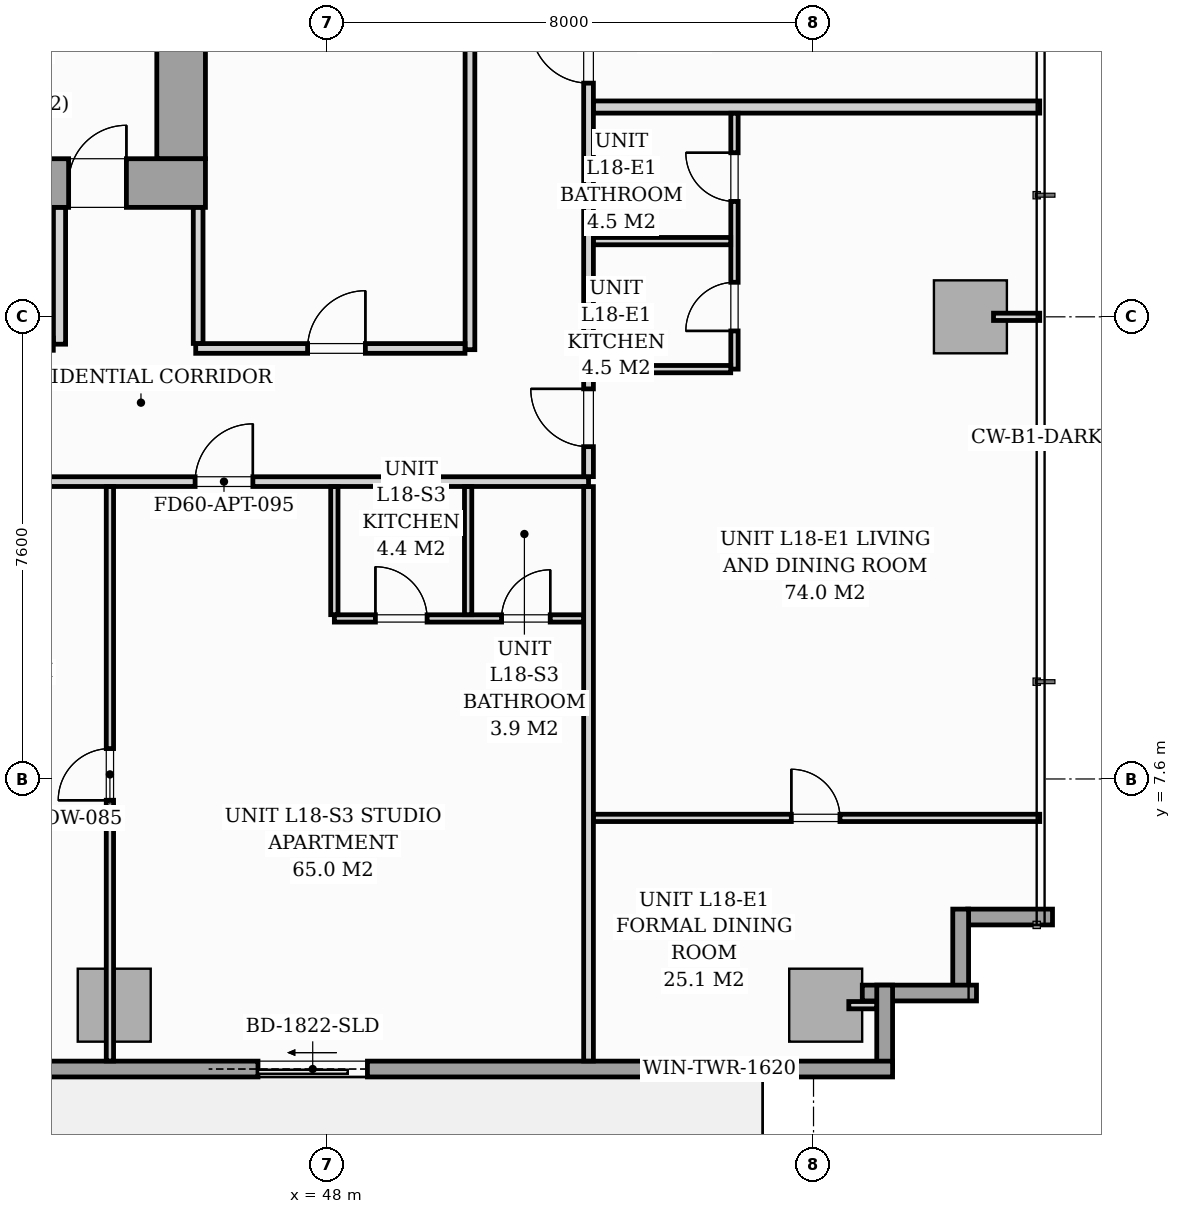
"""IFC4 building model, lengths in metres.
Left out: names, types, materials, properties, quantities, classifications, styles, units other than length and angle.
Written with IfcOpenShell. Run it as: python <this file> out.ifc"""

import sys

from ifc_helpers import new_model, si_unit, direction, frame, frame_2d, origin, origin_2d, place, context, subcontext, project, spatial, rectangle, i_section, extrude, source, transform, mapped, element, fill, save


model = new_model("IFC4")
c1 = context("Model", 3, precision=1e-05, world=origin(), true_north=direction((0.0, 1.0)))
c2 = subcontext(c1, "Body", "Model", "MODEL_VIEW")
j1 = project(units=[si_unit("LENGTHUNIT", "METRE"), si_unit("PLANEANGLEUNIT", "RADIAN")], contexts=[c1])
p1 = place(None, origin())
s1 = spatial("IfcSite", under=j1, at=p1, CompositionType="ELEMENT")
p2 = place(p1, origin())
s2 = spatial("IfcBuilding", under=s1, at=p2, CompositionType="ELEMENT")
p3 = place(p2, frame((0.0, 0.0, 64.6)))
s3 = spatial("IfcBuildingStorey", under=s2, at=p3, CompositionType="ELEMENT", Elevation=64.6)
m1 = source(origin(), c2, "Body", "SweptSolid", [
    extrude(i_section(OverallWidth=0.437, OverallDepth=0.514, WebThickness=0.061, FlangeThickness=0.097, FilletRadius=0.018, at=origin_2d()), origin(), (0.0, 0.0, 1.0), 3.196),
])
p4 = place(p3, frame((45.6, 17.4, 0.002), z_axis=(0.0, 0.0, 1.0), x_axis=(1.0, 0.0, 0.0)))
e1 = element("IfcColumn", 1, at=p4, inside=s3, PredefinedType="PILASTER", context=c2, shape_type="MappedRepresentation", body=[
    mapped(m1, transform((0.0, 0.0, 0.0), scale=1.0)),
])
m2 = source(origin(), c2, "Body", "SweptSolid", [
    extrude(rectangle(XDim=1.2, YDim=1.2, at=origin_2d()), origin(), (0.0, 0.0, 1.0), 3.194),
])
for number, where, z_axis, x_axis in (
    (2, (44.5, 3.88, 0.002), (0.0, 0.0, 1.0), (1.0, 0.0, 0.0)),
    (3, (56.2, 3.88, 0.002), (0.0, 0.0, 1.0), (1.0, 0.0, 0.0)),
    (4, (58.58, 15.2, 0.002), (0.0, 0.0, 1.0), (1.0, 0.0, 0.0)),
):
    element("IfcColumn", number, at=place(p3, frame(where, z_axis=z_axis, x_axis=x_axis)), inside=s3, PredefinedType="COLUMN", context=c2, shape_type="MappedRepresentation", body=[
        mapped(m2, transform((0.0, 0.0, 0.0), scale=1.0)),
    ])
for number, where, z_axis, x_axis in (
    (5, (59.93, 5.33, 0.0), (0.0, 0.0, 1.0), (-1.0, 0.0, 0.0)),
    (6, (58.42, 5.46, 0.0), (0.0, 0.0, 1.0), (0.0, -1.0, 0.0)),
):
    element("IfcWall", number, at=place(p3, frame(where, z_axis=z_axis, x_axis=x_axis)), inside=s3, PredefinedType="STANDARD", context=c2, shape_type="SweptSolid", body=[
        extrude(rectangle(XDim=1.395, YDim=0.26, at=frame_2d((0.698, 0.0))), origin(), (0.0, 0.0, 1.0), 2.9),
    ])
p5 = place(p3, frame((58.68, 4.08, 0.0), z_axis=(0.0, 0.0, 1.0), x_axis=(-1.0, 0.0, 0.0)))
e7 = element("IfcWall", 7, at=p5, inside=s3, PredefinedType="STANDARD", context=c2, shape_type="SweptSolid", body=[
    extrude(rectangle(XDim=1.878, YDim=0.26, at=frame_2d((0.939, 0.0))), origin(), (0.0, 0.0, 1.0), 2.9),
])
p6 = place(p3, frame((57.17, 4.21, 0.0), z_axis=(0.0, 0.0, 1.0), x_axis=(0.0, -1.0, 0.0)))
e8 = element("IfcWall", 8, at=p6, inside=s3, PredefinedType="STANDARD", context=c2, shape_type="SweptSolid", body=[
    extrude(rectangle(XDim=1.395, YDim=0.26, at=frame_2d((0.698, 0.0))), origin(), (0.0, 0.0, 1.0), 2.9),
])
p7 = place(p3, frame((57.3, 2.83, 0.0), z_axis=(0.0, 0.0, 1.0), x_axis=(-1.0, 0.0, 0.0)))
e9 = element("IfcWall", 9, at=p7, inside=s3, PredefinedType="STANDARD", context=c2, shape_type="SweptSolid", body=[
    extrude(rectangle(XDim=17.15, YDim=0.26, at=frame_2d((8.575, 0.0))), origin(), (0.0, 0.0, 1.0), 2.9),
])
p8 = place(p7, frame((8.636, 0.0, 0.0)))
e10 = element("IfcOpeningElement", 10, at=p8, cuts=e9, PredefinedType="OPENING", context=c2, shape_type="SweptSolid", body=[
    extrude(rectangle(XDim=1.8, YDim=2.06, at=frame_2d((0.9, 1.03))), frame((0.0, 0.14, 0.0), z_axis=(0.0, -1.0, 0.0), x_axis=(1.0, 0.0, 0.0)), (0.0, 0.0, 1.0), 0.28),
])
p9 = place(p7, frame((2.05, 0.0, 0.65)))
e11 = element("IfcOpeningElement", 11, at=p9, cuts=e9, PredefinedType="OPENING", context=c2, shape_type="SweptSolid", body=[
    extrude(rectangle(XDim=1.6, YDim=1.5, at=frame_2d((0.8, 0.75))), frame((0.0, 0.14, 0.0), z_axis=(0.0, -1.0, 0.0), x_axis=(1.0, 0.0, 0.0)), (0.0, 0.0, 1.0), 0.28),
])
p10 = place(p3, frame((26.0, 17.4, 0.0), z_axis=(0.0, 0.0, 1.0), x_axis=(1.0, 0.0, 0.0)))
e12 = element("IfcWall", 12, at=p10, inside=s3, PredefinedType="SHEAR", context=c2, shape_type="SweptSolid", body=[
    extrude(rectangle(XDim=20.0, YDim=0.8, at=frame_2d((10.0, 0.0))), origin(), (0.0, 0.0, 1.0), 3.2),
])
p11 = place(p10, frame((1.15, 0.0, 0.0)))
e13 = element("IfcOpeningElement", 13, at=p11, cuts=e12, PredefinedType="OPENING", context=c2, shape_type="SweptSolid", body=[
    extrude(rectangle(XDim=0.95, YDim=2.06, at=frame_2d((0.475, 1.03))), frame((0.0, 0.41, 0.0), z_axis=(0.0, -1.0, 0.0), x_axis=(1.0, 0.0, 0.0)), (0.0, 0.0, 1.0), 0.82),
])
p12 = place(p10, frame((9.58, 0.0, 0.0)))
e14 = element("IfcOpeningElement", 14, at=p12, cuts=e12, PredefinedType="OPENING", context=c2, shape_type="SweptSolid", body=[
    extrude(rectangle(XDim=0.85, YDim=2.0, at=frame_2d((0.425, 1.0))), frame((0.0, 0.41, 0.0), z_axis=(0.0, -1.0, 0.0), x_axis=(1.0, 0.0, 0.0)), (0.0, 0.0, 1.0), 0.82),
])
p13 = place(p10, frame((17.75, 0.0, 0.0)))
e15 = element("IfcOpeningElement", 15, at=p13, cuts=e12, PredefinedType="OPENING", context=c2, shape_type="SweptSolid", body=[
    extrude(rectangle(XDim=0.95, YDim=2.06, at=frame_2d((0.475, 1.03))), frame((0.0, 0.41, 0.0), z_axis=(0.0, -1.0, 0.0), x_axis=(1.0, 0.0, 0.0)), (0.0, 0.0, 1.0), 0.82),
])
p14 = place(p3, frame((45.6, 17.802, 0.0), z_axis=(0.0, 0.0, 1.0), x_axis=(0.0, 1.0, 0.0)))
e16 = element("IfcWall", 16, at=p14, inside=s3, PredefinedType="SHEAR", context=c2, shape_type="SweptSolid", body=[
    extrude(rectangle(XDim=5.796, YDim=0.8, at=frame_2d((2.898, 0.0))), origin(), (0.0, 0.0, 1.0), 3.2),
])
p15 = place(p3, frame((43.6, 14.75, 0.0), z_axis=(0.0, 0.0, 1.0), x_axis=(0.0, 1.0, 0.0)))
e17 = element("IfcWall", 17, at=p15, inside=s3, PredefinedType="PARTITIONING", context=c2, shape_type="SweptSolid", body=[
    extrude(rectangle(XDim=2.248, YDim=0.2, at=frame_2d((1.124, 0.0))), origin(), (0.0, 0.0, 1.0), 2.9),
])
p16 = place(p3, frame((41.352, 14.75, 0.0), z_axis=(0.0, 0.0, 1.0), x_axis=(1.0, 0.0, 0.0)))
e18 = element("IfcWall", 18, at=p16, inside=s3, PredefinedType="PARTITIONING", context=c2, shape_type="SweptSolid", body=[
    extrude(rectangle(XDim=2.146, YDim=0.2, at=frame_2d((1.073, 0.0))), origin(), (0.0, 0.0, 1.0), 2.9),
])
p17 = place(p3, frame((15.2, 12.49, 0.0), z_axis=(0.0, 0.0, 1.0), x_axis=(1.0, 0.0, 0.0)))
e19 = element("IfcWall", 19, at=p17, inside=s3, PredefinedType="PARTITIONING", context=c2, shape_type="SweptSolid", body=[
    extrude(rectangle(XDim=37.1, YDim=0.16, at=frame_2d((18.55, 0.0))), origin(), (0.0, 0.0, 1.0), 2.9),
])
p18 = place(p17, frame((5.863, 0.0, 0.0)))
e20 = element("IfcOpeningElement", 20, at=p18, cuts=e19, PredefinedType="OPENING", context=c2, shape_type="SweptSolid", body=[
    extrude(rectangle(XDim=0.95, YDim=2.06, at=frame_2d((0.475, 1.03))), frame((0.0, 0.09, 0.0), z_axis=(0.0, -1.0, 0.0), x_axis=(1.0, 0.0, 0.0)), (0.0, 0.0, 1.0), 0.18),
])
p19 = place(p17, frame((18.25, 0.0, 0.0)))
e21 = element("IfcOpeningElement", 21, at=p19, cuts=e19, PredefinedType="OPENING", context=c2, shape_type="SweptSolid", body=[
    extrude(rectangle(XDim=0.95, YDim=2.06, at=frame_2d((0.475, 1.03))), frame((0.0, 0.09, 0.0), z_axis=(0.0, -1.0, 0.0), x_axis=(1.0, 0.0, 0.0)), (0.0, 0.0, 1.0), 0.18),
])
p20 = place(p17, frame((30.63, 0.0, 0.0)))
e22 = element("IfcOpeningElement", 22, at=p20, cuts=e19, PredefinedType="OPENING", context=c2, shape_type="SweptSolid", body=[
    extrude(rectangle(XDim=0.95, YDim=2.06, at=frame_2d((0.475, 1.03))), frame((0.0, 0.09, 0.0), z_axis=(0.0, -1.0, 0.0), x_axis=(1.0, 0.0, 0.0)), (0.0, 0.0, 1.0), 0.18),
])
p21 = place(p3, frame((52.3, 2.962, 0.0), z_axis=(0.0, 0.0, 1.0), x_axis=(0.0, 1.0, 0.0)))
e23 = element("IfcWall", 23, at=p21, inside=s3, PredefinedType="PARTITIONING", context=c2, shape_type="SweptSolid", body=[
    extrude(rectangle(XDim=9.446, YDim=0.16, at=frame_2d((4.723, 0.0))), origin(), (0.0, 0.0, 1.0), 2.9),
])
p22 = place(p3, frame((52.3, 12.572, 0.0), z_axis=(0.0, 0.0, 1.0), x_axis=(0.0, 1.0, 0.0)))
e24 = element("IfcWall", 24, at=p22, inside=s3, PredefinedType="PARTITIONING", context=c2, shape_type="SweptSolid", body=[
    extrude(rectangle(XDim=14.866, YDim=0.16, at=frame_2d((7.433, 0.0))), origin(), (0.0, 0.0, 1.0), 2.9),
])
p23 = place(p22, frame((0.493, 0.0, 0.0)))
e25 = element("IfcOpeningElement", 25, at=p23, cuts=e24, PredefinedType="OPENING", context=c2, shape_type="SweptSolid", body=[
    extrude(rectangle(XDim=0.95, YDim=2.06, at=frame_2d((0.475, 1.03))), frame((0.0, 0.09, 0.0), z_axis=(0.0, -1.0, 0.0), x_axis=(1.0, 0.0, 0.0)), (0.0, 0.0, 1.0), 0.18),
])
p24 = place(p22, frame((6.471, 0.0, 0.0)))
e26 = element("IfcOpeningElement", 26, at=p24, cuts=e24, PredefinedType="OPENING", context=c2, shape_type="SweptSolid", body=[
    extrude(rectangle(XDim=0.95, YDim=2.06, at=frame_2d((0.475, 1.03))), frame((0.0, 0.09, 0.0), z_axis=(0.0, -1.0, 0.0), x_axis=(1.0, 0.0, 0.0)), (0.0, 0.0, 1.0), 0.18),
])
p25 = place(p3, frame((48.12, 10.24, 0.0), z_axis=(0.0, 0.0, 1.0), x_axis=(1.0, 0.0, 0.0)))
e27 = element("IfcWall", 27, at=p25, inside=s3, PredefinedType="PARTITIONING", context=c2, shape_type="SweptSolid", body=[
    extrude(rectangle(XDim=4.098, YDim=0.12, at=frame_2d((2.049, 0.0))), origin(), (0.0, 0.0, 1.0), 2.9),
])
p26 = place(p25, frame((0.675, 0.0, 0.0)))
e28 = element("IfcOpeningElement", 28, at=p26, cuts=e27, PredefinedType="OPENING", context=c2, shape_type="SweptSolid", body=[
    extrude(rectangle(XDim=0.85, YDim=2.05, at=frame_2d((0.425, 1.025))), frame((0.0, 0.07, 0.0), z_axis=(0.0, -1.0, 0.0), x_axis=(1.0, 0.0, 0.0)), (0.0, 0.0, 1.0), 0.14),
])
p27 = place(p25, frame((2.75, 0.0, 0.0)))
e29 = element("IfcOpeningElement", 29, at=p27, cuts=e27, PredefinedType="OPENING", context=c2, shape_type="SweptSolid", body=[
    extrude(rectangle(XDim=0.8, YDim=2.02, at=frame_2d((0.4, 1.01))), frame((0.0, 0.07, 0.0), z_axis=(0.0, -1.0, 0.0), x_axis=(1.0, 0.0, 0.0)), (0.0, 0.0, 1.0), 0.14),
])
for number, where, z_axis, x_axis in (
    (30, (48.12, 10.302, 0.0), (0.0, 0.0, 1.0), (0.0, 1.0, 0.0)),
    (31, (50.32, 10.302, 0.0), (0.0, 0.0, 1.0), (0.0, 1.0, 0.0)),
):
    element("IfcWall", number, at=place(p3, frame(where, z_axis=z_axis, x_axis=x_axis)), inside=s3, PredefinedType="PARTITIONING", context=c2, shape_type="SweptSolid", body=[
        extrude(rectangle(XDim=2.106, YDim=0.12, at=frame_2d((1.053, 0.0))), origin(), (0.0, 0.0, 1.0), 2.9),
    ])
p28 = place(p3, frame((44.429, 2.962, 0.0), z_axis=(0.0, 0.0, 1.0), x_axis=(0.0, 1.0, 0.0)))
e32 = element("IfcWall", 32, at=p28, inside=s3, PredefinedType="PARTITIONING", context=c2, shape_type="SweptSolid", body=[
    extrude(rectangle(XDim=9.446, YDim=0.12, at=frame_2d((4.723, 0.0))), origin(), (0.0, 0.0, 1.0), 2.096),
])
p29 = place(p28, frame((4.288, 0.0, 0.0)))
e33 = element("IfcOpeningElement", 33, at=p29, cuts=e32, PredefinedType="OPENING", context=c2, shape_type="SweptSolid", body=[
    extrude(rectangle(XDim=0.85, YDim=2.01, at=frame_2d((0.425, 1.005))), frame((0.0, 0.07, 0.0), z_axis=(0.0, -1.0, 0.0), x_axis=(1.0, 0.0, 0.0)), (0.0, 0.0, 1.0), 0.14),
])
p30 = place(p3, frame((52.382, 18.65, 0.0), z_axis=(0.0, 0.0, 1.0), x_axis=(1.0, 0.0, 0.0)))
e34 = element("IfcWall", 34, at=p30, inside=s3, PredefinedType="PARTITIONING", context=c2, shape_type="SweptSolid", body=[
    extrude(rectangle(XDim=7.338, YDim=0.2, at=frame_2d((3.669, 0.0))), origin(), (0.0, 0.0, 1.0), 2.9),
])
p31 = place(p3, frame((54.7, 14.34, 0.0), z_axis=(0.0, 0.0, 1.0), x_axis=(0.0, 1.0, 0.0)))
e35 = element("IfcWall", 35, at=p31, inside=s3, PredefinedType="PARTITIONING", context=c2, shape_type="SweptSolid", body=[
    extrude(rectangle(XDim=4.208, YDim=0.12, at=frame_2d((2.104, 0.0))), origin(), (0.0, 0.0, 1.0), 2.005),
])
p32 = place(p31, frame((0.628, 0.0, 0.0)))
e36 = element("IfcOpeningElement", 36, at=p32, cuts=e35, PredefinedType="OPENING", context=c2, shape_type="SweptSolid", body=[
    extrude(rectangle(XDim=0.8, YDim=2.0, at=frame_2d((0.4, 1.0))), frame((0.0, 0.07, 0.0), z_axis=(0.0, -1.0, 0.0), x_axis=(1.0, 0.0, 0.0)), (0.0, 0.0, 1.0), 0.14),
])
p33 = place(p31, frame((2.758, 0.0, 0.0)))
e37 = element("IfcOpeningElement", 37, at=p33, cuts=e35, PredefinedType="OPENING", context=c2, shape_type="SweptSolid", body=[
    extrude(rectangle(XDim=0.8, YDim=2.0, at=frame_2d((0.4, 1.0))), frame((0.0, 0.07, 0.0), z_axis=(0.0, -1.0, 0.0), x_axis=(1.0, 0.0, 0.0)), (0.0, 0.0, 1.0), 0.14),
])
p34 = place(p3, frame((52.382, 16.445, 0.0), z_axis=(0.0, 0.0, 1.0), x_axis=(1.0, 0.0, 0.0)))
e38 = element("IfcWall", 38, at=p34, inside=s3, PredefinedType="PARTITIONING", context=c2, shape_type="SweptSolid", body=[
    extrude(rectangle(XDim=2.256, YDim=0.12, at=frame_2d((1.128, 0.0))), origin(), (0.0, 0.0, 1.0), 2.005),
])
p35 = place(p3, frame((52.382, 14.34, 0.0), z_axis=(0.0, 0.0, 1.0), x_axis=(1.0, 0.0, 0.0)))
e39 = element("IfcWall", 39, at=p35, inside=s3, PredefinedType="PARTITIONING", context=c2, shape_type="SweptSolid", body=[
    extrude(rectangle(XDim=2.256, YDim=0.12, at=frame_2d((1.128, 0.0))), origin(), (0.0, 0.0, 1.0), 2.9),
])
p36 = place(p3, frame((52.382, 6.96, 0.0), z_axis=(0.0, 0.0, 1.0), x_axis=(1.0, 0.0, 0.0)))
e40 = element("IfcWall", 40, at=p36, inside=s3, PredefinedType="PARTITIONING", context=c2, shape_type="SweptSolid", body=[
    extrude(rectangle(XDim=7.338, YDim=0.12, at=frame_2d((3.669, 0.0))), origin(), (0.0, 0.0, 1.0), 2.9),
])
p37 = place(p36, frame((3.253, 0.0, 0.0)))
e41 = element("IfcOpeningElement", 41, at=p37, cuts=e40, PredefinedType="OPENING", context=c2, shape_type="SweptSolid", body=[
    extrude(rectangle(XDim=0.8, YDim=2.0, at=frame_2d((0.4, 1.0))), frame((0.0, 0.07, 0.0), z_axis=(0.0, -1.0, 0.0), x_axis=(1.0, 0.0, 0.0)), (0.0, 0.0, 1.0), 0.14),
])
p38 = place(p3, frame((50.35, 14.66, 0.0), z_axis=(0.0, 0.0, 1.0), x_axis=(0.0, 1.0, 0.0)))
e42 = element("IfcWall", 42, at=p38, inside=s3, PredefinedType="PARTITIONING", context=c2, shape_type="SweptSolid", body=[
    extrude(rectangle(XDim=5.99, YDim=0.16, at=frame_2d((2.995, 0.0))), origin(), (0.0, 0.0, 1.0), 2.9),
])
p39 = place(p3, frame((45.84, 14.68, 0.0), z_axis=(0.0, 0.0, 1.0), x_axis=(1.0, 0.0, 0.0)))
e43 = element("IfcWall", 43, at=p39, inside=s3, PredefinedType="PARTITIONING", context=c2, shape_type="SweptSolid", body=[
    extrude(rectangle(XDim=4.428, YDim=0.16, at=frame_2d((2.214, 0.0))), origin(), (0.0, 0.0, 1.0), 2.9),
])
p40 = place(p39, frame((1.84, 0.0, 0.0)))
e44 = element("IfcOpeningElement", 44, at=p40, cuts=e43, PredefinedType="OPENING", context=c2, shape_type="SweptSolid", body=[
    extrude(rectangle(XDim=0.95, YDim=2.06, at=frame_2d((0.475, 1.03))), frame((0.0, 0.09, 0.0), z_axis=(0.0, -1.0, 0.0), x_axis=(1.0, 0.0, 0.0)), (0.0, 0.0, 1.0), 0.18),
])
p41 = place(p3, frame((45.88, 14.762, 0.0), z_axis=(0.0, 0.0, 1.0), x_axis=(0.0, 1.0, 0.0)))
e45 = element("IfcWall", 45, at=p41, inside=s3, PredefinedType="PARTITIONING", context=c2, shape_type="SweptSolid", body=[
    extrude(rectangle(XDim=2.236, YDim=0.16, at=frame_2d((1.118, 0.0))), origin(), (0.0, 0.0, 1.0), 2.9),
])
p42 = place(p3, frame((56.58, 3.88, 0.0), z_axis=(0.0, 0.0, 1.0), x_axis=(1.0, 0.0, 0.0)))
e46 = element("IfcWall", 46, at=p42, inside=s3, PredefinedType="PARTITIONING", context=c2, shape_type="SweptSolid", body=[
    extrude(rectangle(XDim=0.458, YDim=0.12, at=frame_2d((0.229, 0.0))), origin(), (0.0, 0.0, 1.0), 2.9),
])
p43 = place(p3, frame((58.96, 15.2, 0.0), z_axis=(0.0, 0.0, 1.0), x_axis=(1.0, 0.0, 0.0)))
e47 = element("IfcWall", 47, at=p43, inside=s3, PredefinedType="PARTITIONING", context=c2, shape_type="SweptSolid", body=[
    extrude(rectangle(XDim=0.76, YDim=0.12, at=frame_2d((0.38, 0.0))), origin(), (0.0, 0.0, 1.0), 2.9),
])
m3 = source(origin(), c2, "Body", "SweptSolid", [
    extrude(rectangle(XDim=1.8, YDim=2.06, at=frame_2d((0.9, 1.03))), frame((0.0, 0.025, 0.0), z_axis=(0.0, -1.0, 0.0), x_axis=(1.0, 0.0, 0.0)), (0.0, 0.0, 1.0), 0.05),
])
p44 = place(p8, origin())
e48 = element("IfcDoor", 48, at=p44, inside=s3, OperationType="SLIDING_TO_RIGHT", PredefinedType="DOOR", context=c2, shape_type="MappedRepresentation", body=[
    mapped(m3, transform((0.0, 0.0, 0.0), scale=1.0)),
])
fill(e10, e48)
m4 = source(origin(), c2, "Body", "SweptSolid", [
    extrude(rectangle(XDim=1.6, YDim=1.5, at=frame_2d((0.8, 0.75))), frame((0.0, 0.03, 0.0), z_axis=(0.0, -1.0, 0.0), x_axis=(1.0, 0.0, 0.0)), (0.0, 0.0, 1.0), 0.06),
])
p45 = place(p9, origin())
e49 = element("IfcWindow", 49, at=p45, inside=s3, PartitioningType="SINGLE_PANEL", PredefinedType="WINDOW", context=c2, shape_type="MappedRepresentation", body=[
    mapped(m4, transform((0.0, 0.0, 0.0), scale=1.0)),
])
fill(e11, e49)
m5 = source(origin(), c2, "Body", "SweptSolid", [
    extrude(rectangle(XDim=0.95, YDim=2.06, at=frame_2d((0.475, 1.03))), frame((0.0, 0.025, 0.0), z_axis=(0.0, -1.0, 0.0), x_axis=(1.0, 0.0, 0.0)), (0.0, 0.0, 1.0), 0.05),
])
p46 = place(p13, origin())
e50 = element("IfcDoor", 50, at=p46, inside=s3, OperationType="SINGLE_SWING_RIGHT", PredefinedType="DOOR", context=c2, shape_type="MappedRepresentation", body=[
    mapped(m5, transform((0.0, 0.0, 0.0), scale=1.0)),
])
fill(e15, e50)
m6 = source(origin(), c2, "Body", "SweptSolid", [
    extrude(rectangle(XDim=0.85, YDim=2.01, at=frame_2d((0.425, 1.005))), frame((0.0, 0.025, 0.0), z_axis=(0.0, -1.0, 0.0), x_axis=(1.0, 0.0, 0.0)), (0.0, 0.0, 1.0), 0.05),
])
p47 = place(p29, origin())
e51 = element("IfcDoor", 51, at=p47, inside=s3, OperationType="SINGLE_SWING_LEFT", PredefinedType="DOOR", context=c2, shape_type="MappedRepresentation", body=[
    mapped(m6, transform((0.0, 0.0, 0.0), scale=1.0)),
])
fill(e33, e51)
m7 = source(origin(), c2, "Body", "SweptSolid", [
    extrude(rectangle(XDim=0.95, YDim=2.06, at=frame_2d((0.475, 1.03))), frame((0.0, 0.025, 0.0), z_axis=(0.0, -1.0, 0.0), x_axis=(1.0, 0.0, 0.0)), (0.0, 0.0, 1.0), 0.05),
])
p48 = place(p20, origin())
e52 = element("IfcDoor", 52, at=p48, inside=s3, OperationType="SINGLE_SWING_RIGHT", PredefinedType="DOOR", context=c2, shape_type="MappedRepresentation", body=[
    mapped(m7, transform((0.0, 0.0, 0.0), scale=1.0)),
])
fill(e22, e52)
m8 = source(origin(), c2, "Body", "SweptSolid", [
    extrude(rectangle(XDim=0.85, YDim=2.05, at=frame_2d((0.425, 1.025))), frame((0.0, 0.025, 0.0), z_axis=(0.0, -1.0, 0.0), x_axis=(1.0, 0.0, 0.0)), (0.0, 0.0, 1.0), 0.05),
])
p49 = place(p26, origin())
e53 = element("IfcDoor", 53, at=p49, inside=s3, OperationType="SINGLE_SWING_LEFT", PredefinedType="DOOR", context=c2, shape_type="MappedRepresentation", body=[
    mapped(m8, transform((0.0, 0.0, 0.0), scale=1.0)),
])
fill(e28, e53)
m9 = source(origin(), c2, "Body", "SweptSolid", [
    extrude(rectangle(XDim=0.8, YDim=2.02, at=frame_2d((0.4, 1.01))), frame((0.0, 0.025, 0.0), z_axis=(0.0, -1.0, 0.0), x_axis=(1.0, 0.0, 0.0)), (0.0, 0.0, 1.0), 0.05),
])
p50 = place(p27, origin())
e54 = element("IfcDoor", 54, at=p50, inside=s3, OperationType="SINGLE_SWING_RIGHT", PredefinedType="DOOR", context=c2, shape_type="MappedRepresentation", body=[
    mapped(m9, transform((0.0, 0.0, 0.0), scale=1.0)),
])
fill(e29, e54)
p51 = place(p23, origin())
e55 = element("IfcDoor", 55, at=p51, inside=s3, OperationType="SINGLE_SWING_RIGHT", PredefinedType="DOOR", context=c2, shape_type="MappedRepresentation", body=[
    mapped(m7, transform((0.0, 0.0, 0.0), scale=1.0)),
])
fill(e25, e55)
m10 = source(origin(), c2, "Body", "SweptSolid", [
    extrude(rectangle(XDim=0.8, YDim=2.0, at=frame_2d((0.4, 1.0))), frame((0.0, 0.025, 0.0), z_axis=(0.0, -1.0, 0.0), x_axis=(1.0, 0.0, 0.0)), (0.0, 0.0, 1.0), 0.05),
])
p52 = place(p32, origin())
e56 = element("IfcDoor", 56, at=p52, inside=s3, OperationType="SINGLE_SWING_LEFT", PredefinedType="DOOR", context=c2, shape_type="MappedRepresentation", body=[
    mapped(m10, transform((0.0, 0.0, 0.0), scale=1.0)),
])
fill(e36, e56)
p53 = place(p33, origin())
e57 = element("IfcDoor", 57, at=p53, inside=s3, OperationType="SINGLE_SWING_RIGHT", PredefinedType="DOOR", context=c2, shape_type="MappedRepresentation", body=[
    mapped(m10, transform((0.0, 0.0, 0.0), scale=1.0)),
])
fill(e37, e57)
p54 = place(p37, origin())
e58 = element("IfcDoor", 58, at=p54, inside=s3, OperationType="SINGLE_SWING_LEFT", PredefinedType="DOOR", context=c2, shape_type="MappedRepresentation", body=[
    mapped(m10, transform((0.0, 0.0, 0.0), scale=1.0)),
])
fill(e41, e58)
p55 = place(p24, origin())
e59 = element("IfcDoor", 59, at=p55, inside=s3, OperationType="SINGLE_SWING_RIGHT", PredefinedType="DOOR", context=c2, shape_type="MappedRepresentation", body=[
    mapped(m7, transform((0.0, 0.0, 0.0), scale=1.0)),
])
fill(e26, e59)
p56 = place(p40, origin())
e60 = element("IfcDoor", 60, at=p56, inside=s3, OperationType="SINGLE_SWING_RIGHT", PredefinedType="DOOR", context=c2, shape_type="MappedRepresentation", body=[
    mapped(m7, transform((0.0, 0.0, 0.0), scale=1.0)),
])
fill(e44, e60)
save(model, sys.argv[1])
